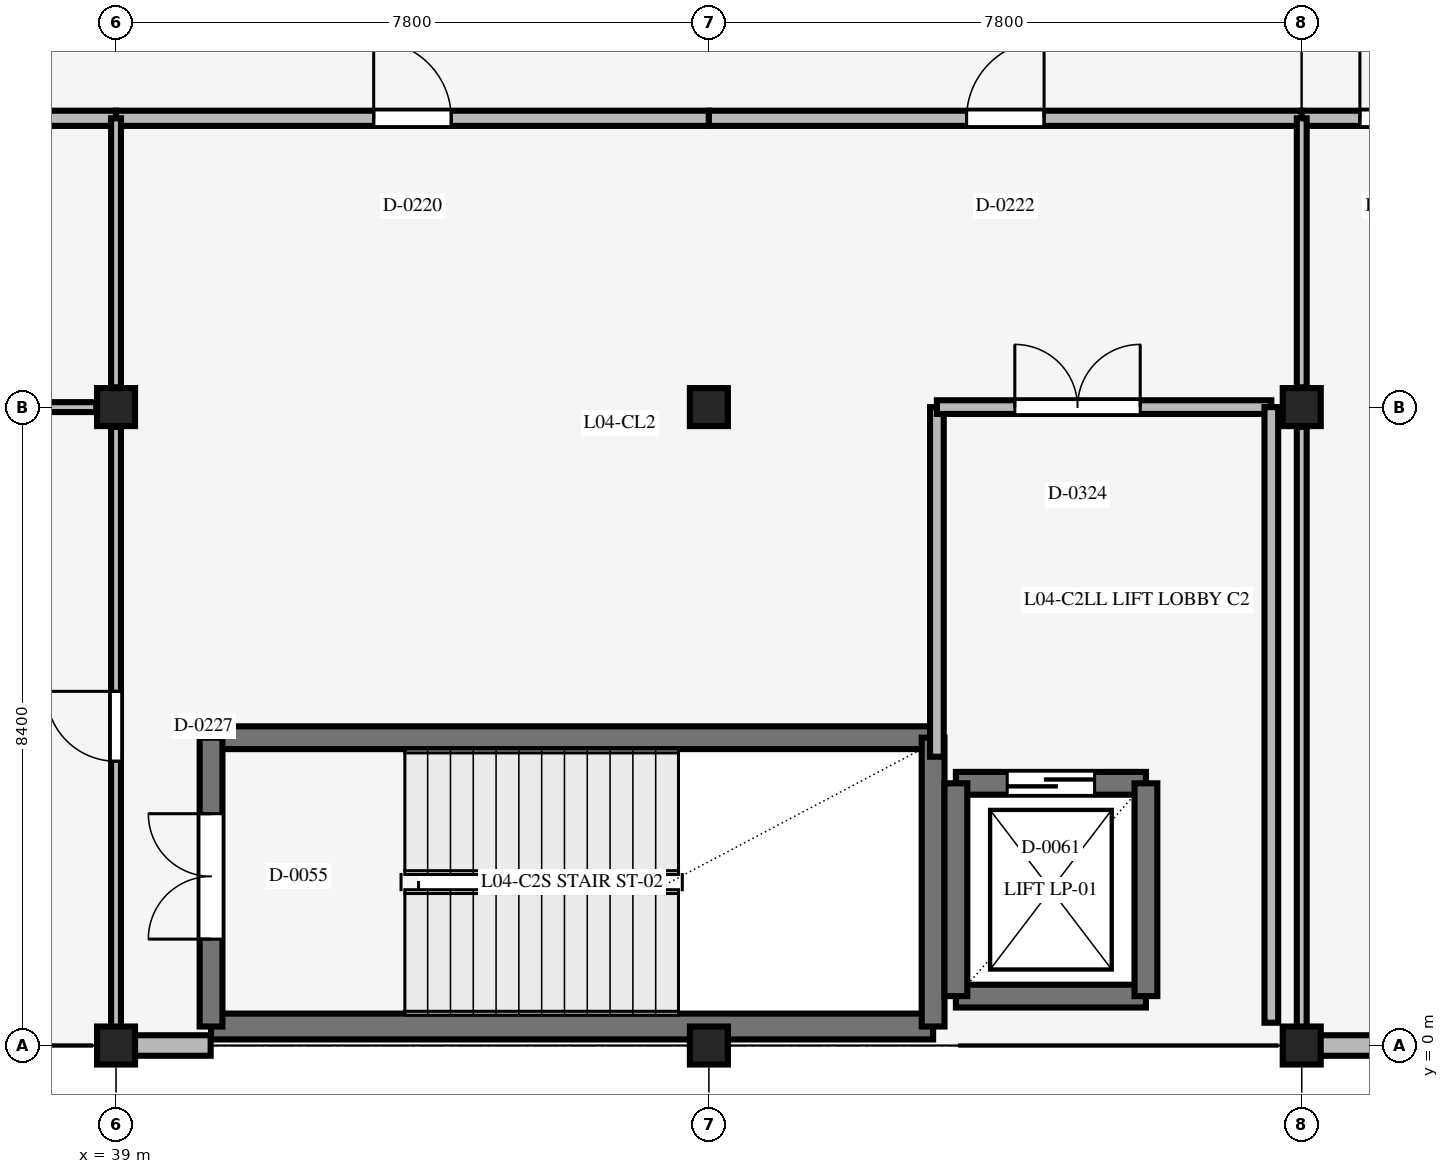
"""IFC4 building model, lengths in metres.
Left out: names, types, materials, properties, quantities, classifications, styles, units other than length and angle.
Written with IfcOpenShell. Run it as: python <this file> out.ifc"""

import sys

from ifc_helpers import new_model, si_unit, direction, frame, frame_2d, origin, origin_2d, place, context, subcontext, project, spatial, rectangle, extrude, element, fill, save


model = new_model("IFC4")
c1 = context("Model", 3, precision=1e-05, world=origin(), true_north=direction((0.0, 1.0)))
c2 = subcontext(c1, "Body", "Model", "MODEL_VIEW")
j1 = project(units=[si_unit("LENGTHUNIT", "METRE"), si_unit("PLANEANGLEUNIT", "RADIAN")], contexts=[c1])
p1 = place(None, origin())
s1 = spatial("IfcSite", under=j1, at=p1, CompositionType="ELEMENT")
p2 = place(p1, origin())
s2 = spatial("IfcBuilding", under=s1, at=p2, CompositionType="ELEMENT")
p3 = place(p2, frame((0.0, 0.0, 19.8)))
s3 = spatial("IfcBuildingStorey", under=s2, at=p3, CompositionType="ELEMENT", Elevation=19.8)
for number, where, z_axis, x_axis in (
    (1, (39.0, 0.0, 0.0), (0.0, 0.0, 1.0), (1.0, 0.0, 0.0)),
    (2, (39.0, 8.4, 0.0), (0.0, 0.0, 1.0), (1.0, 0.0, 0.0)),
    (3, (46.8, 0.0, 0.0), (0.0, 0.0, 1.0), (1.0, 0.0, 0.0)),
    (4, (46.8, 8.4, 0.0), (0.0, 0.0, 1.0), (1.0, 0.0, 0.0)),
    (5, (54.6, 0.0, 0.0), (0.0, 0.0, 1.0), (1.0, 0.0, 0.0)),
    (6, (54.6, 8.4, 0.0), (0.0, 0.0, 1.0), (1.0, 0.0, 0.0)),
):
    element("IfcColumn", number, at=place(p3, frame(where, z_axis=z_axis, x_axis=x_axis)), inside=s3, PredefinedType="COLUMN", context=c2, shape_type="SweptSolid", body=[
        extrude(rectangle(XDim=0.5, YDim=0.5, at=origin_2d()), origin(), (0.0, 0.0, 1.0), 3.9),
    ])
p4 = place(p3, frame((49.75, 0.25, 0.0), z_axis=(0.0, 0.0, 1.0), x_axis=(-1.0, 0.0, 0.0)))
e7 = element("IfcWall", 7, at=p4, inside=s3, PredefinedType="STANDARD", context=c2, shape_type="SweptSolid", body=[
    extrude(rectangle(XDim=9.5, YDim=0.34, at=frame_2d((4.75, 0.0))), origin(), (0.0, 0.0, 1.0), 3.9),
])
p5 = place(p3, frame((40.25, 4.05, 0.0), z_axis=(0.0, 0.0, 1.0), x_axis=(1.0, 0.0, 0.0)))
e8 = element("IfcWall", 8, at=p5, inside=s3, PredefinedType="SHEAR", context=c2, shape_type="SweptSolid", body=[
    extrude(rectangle(XDim=9.5, YDim=0.3, at=frame_2d((4.75, 0.0))), origin(), (0.0, 0.0, 1.0), 3.9),
])
p6 = place(p3, frame((40.25, 0.25, 0.0), z_axis=(0.0, 0.0, 1.0), x_axis=(0.0, 1.0, 0.0)))
e9 = element("IfcWall", 9, at=p6, inside=s3, PredefinedType="SHEAR", context=c2, shape_type="SweptSolid", body=[
    extrude(rectangle(XDim=3.8, YDim=0.3, at=frame_2d((1.9, 0.0))), origin(), (0.0, 0.0, 1.0), 3.9),
])
p7 = place(p6, frame((1.15, 0.0, 0.0)))
e10 = element("IfcOpeningElement", 10, at=p7, cuts=e9, PredefinedType="OPENING", context=c2, shape_type="SweptSolid", body=[
    extrude(rectangle(XDim=1.65, YDim=2.2, at=frame_2d((0.825, 1.1))), frame((0.0, 0.16, 0.0), z_axis=(0.0, -1.0, 0.0), x_axis=(1.0, 0.0, 0.0)), (0.0, 0.0, 1.0), 0.32),
])
p8 = place(p3, frame((49.75, 0.25, 0.0), z_axis=(0.0, 0.0, 1.0), x_axis=(0.0, 1.0, 0.0)))
e11 = element("IfcWall", 11, at=p8, inside=s3, PredefinedType="SHEAR", context=c2, shape_type="SweptSolid", body=[
    extrude(rectangle(XDim=3.8, YDim=0.3, at=frame_2d((1.9, 0.0))), origin(), (0.0, 0.0, 1.0), 3.9),
])
p9 = place(p3, frame((50.05, 0.65, 0.0), z_axis=(0.0, 0.0, 1.0), x_axis=(1.0, 0.0, 0.0)))
e12 = element("IfcWall", 12, at=p9, inside=s3, PredefinedType="SHEAR", context=c2, shape_type="SweptSolid", body=[
    extrude(rectangle(XDim=2.5, YDim=0.3, at=frame_2d((1.25, 0.0))), origin(), (0.0, 0.0, 1.0), 3.4),
])
p10 = place(p3, frame((50.05, 3.45, 0.0), z_axis=(0.0, 0.0, 1.0), x_axis=(1.0, 0.0, 0.0)))
e13 = element("IfcWall", 13, at=p10, inside=s3, PredefinedType="SHEAR", context=c2, shape_type="SweptSolid", body=[
    extrude(rectangle(XDim=2.5, YDim=0.3, at=frame_2d((1.25, 0.0))), origin(), (0.0, 0.0, 1.0), 3.4),
])
p11 = place(p10, frame((0.675, 0.0, 0.0)))
e14 = element("IfcOpeningElement", 14, at=p11, cuts=e13, PredefinedType="OPENING", context=c2, shape_type="SweptSolid", body=[
    extrude(rectangle(XDim=1.15, YDim=2.2, at=frame_2d((0.575, 1.1))), frame((0.0, 0.16, 0.0), z_axis=(0.0, -1.0, 0.0), x_axis=(1.0, 0.0, 0.0)), (0.0, 0.0, 1.0), 0.32),
])
for number, where, z_axis, x_axis in (
    (15, (50.05, 0.65, 0.0), (0.0, 0.0, 1.0), (0.0, 1.0, 0.0)),
    (16, (52.55, 0.65, 0.0), (0.0, 0.0, 1.0), (0.0, 1.0, 0.0)),
):
    element("IfcWall", number, at=place(p3, frame(where, z_axis=z_axis, x_axis=x_axis)), inside=s3, PredefinedType="SHEAR", context=c2, shape_type="SweptSolid", body=[
        extrude(rectangle(XDim=2.8, YDim=0.3, at=frame_2d((1.4, 0.0))), origin(), (0.0, 0.0, 1.0), 3.4),
    ])
p12 = place(p3, frame((40.245, 0.0, 0.0), z_axis=(0.0, 0.0, 1.0), x_axis=(-1.0, 0.0, 0.0)))
e17 = element("IfcWall", 17, at=p12, inside=s3, PredefinedType="STANDARD", context=c2, shape_type="SweptSolid", body=[
    extrude(rectangle(XDim=1.493, YDim=0.27, at=frame_2d((0.746, 0.0))), origin(), (0.0, 0.0, 1.0), 4.8),
])
p13 = place(p3, frame((62.76, 0.0, 0.0), z_axis=(0.0, 0.0, 1.0), x_axis=(-1.0, 0.0, 0.0)))
e18 = element("IfcWall", 18, at=p13, inside=s3, PredefinedType="STANDARD", context=c2, shape_type="SweptSolid", body=[
    extrude(rectangle(XDim=8.4, YDim=0.27, at=frame_2d((4.2, 0.0))), origin(), (0.0, 0.0, 1.0), 4.8),
])
p14 = place(p13, frame((1.01, 0.0, 0.9)))
e19 = element("IfcOpeningElement", 19, at=p14, cuts=e18, PredefinedType="OPENING", context=c2, shape_type="SweptSolid", body=[
    extrude(rectangle(XDim=3.2, YDim=2.1, at=frame_2d((1.6, 1.05))), frame((0.0, 0.145, 0.0), z_axis=(0.0, -1.0, 0.0), x_axis=(1.0, 0.0, 0.0)), (0.0, 0.0, 1.0), 0.29),
])
p15 = place(p3, frame((31.2, 12.2, 0.0), z_axis=(0.0, 0.0, 1.0), x_axis=(1.0, 0.0, 0.0)))
e20 = element("IfcWall", 20, at=p15, inside=s3, PredefinedType="STANDARD", context=c2, shape_type="SweptSolid", body=[
    extrude(rectangle(XDim=7.8, YDim=0.2, at=frame_2d((3.9, 0.0))), origin(), (0.0, 0.0, 1.0), 2.9),
])
p16 = place(p15, frame((3.39, 0.0, 0.0)))
e21 = element("IfcOpeningElement", 21, at=p16, cuts=e20, PredefinedType="OPENING", context=c2, shape_type="SweptSolid", body=[
    extrude(rectangle(XDim=1.02, YDim=2.15, at=frame_2d((0.51, 1.075))), frame((0.0, 0.11, 0.0), z_axis=(0.0, -1.0, 0.0), x_axis=(1.0, 0.0, 0.0)), (0.0, 0.0, 1.0), 0.22),
])
p17 = place(p3, frame((39.0, 12.2, 0.0), z_axis=(0.0, 0.0, 1.0), x_axis=(1.0, 0.0, 0.0)))
e22 = element("IfcWall", 22, at=p17, inside=s3, PredefinedType="STANDARD", context=c2, shape_type="SweptSolid", body=[
    extrude(rectangle(XDim=7.8, YDim=0.2, at=frame_2d((3.9, 0.0))), origin(), (0.0, 0.0, 1.0), 2.9),
])
p18 = place(p17, frame((3.39, 0.0, 0.0)))
e23 = element("IfcOpeningElement", 23, at=p18, cuts=e22, PredefinedType="OPENING", context=c2, shape_type="SweptSolid", body=[
    extrude(rectangle(XDim=1.02, YDim=2.15, at=frame_2d((0.51, 1.075))), frame((0.0, 0.11, 0.0), z_axis=(0.0, -1.0, 0.0), x_axis=(1.0, 0.0, 0.0)), (0.0, 0.0, 1.0), 0.22),
])
p19 = place(p3, frame((46.8, 12.2, 0.0), z_axis=(0.0, 0.0, 1.0), x_axis=(1.0, 0.0, 0.0)))
e24 = element("IfcWall", 24, at=p19, inside=s3, PredefinedType="STANDARD", context=c2, shape_type="SweptSolid", body=[
    extrude(rectangle(XDim=7.8, YDim=0.2, at=frame_2d((3.9, 0.0))), origin(), (0.0, 0.0, 1.0), 2.9),
])
p20 = place(p19, frame((3.39, 0.0, 0.0)))
e25 = element("IfcOpeningElement", 25, at=p20, cuts=e24, PredefinedType="OPENING", context=c2, shape_type="SweptSolid", body=[
    extrude(rectangle(XDim=1.02, YDim=2.15, at=frame_2d((0.51, 1.075))), frame((0.0, 0.11, 0.0), z_axis=(0.0, -1.0, 0.0), x_axis=(1.0, 0.0, 0.0)), (0.0, 0.0, 1.0), 0.22),
])
p21 = place(p3, frame((54.6, 12.2, 0.0), z_axis=(0.0, 0.0, 1.0), x_axis=(1.0, 0.0, 0.0)))
e26 = element("IfcWall", 26, at=p21, inside=s3, PredefinedType="STANDARD", context=c2, shape_type="SweptSolid", body=[
    extrude(rectangle(XDim=2.45, YDim=0.2, at=frame_2d((1.225, 0.0))), origin(), (0.0, 0.0, 1.0), 2.9),
])
p22 = place(p21, frame((0.765, 0.0, 0.0)))
e27 = element("IfcOpeningElement", 27, at=p22, cuts=e26, PredefinedType="OPENING", context=c2, shape_type="SweptSolid", body=[
    extrude(rectangle(XDim=0.92, YDim=2.15, at=frame_2d((0.46, 1.075))), frame((0.0, 0.11, 0.0), z_axis=(0.0, -1.0, 0.0), x_axis=(1.0, 0.0, 0.0)), (0.0, 0.0, 1.0), 0.22),
])
p23 = place(p3, frame((39.0, 0.14, 0.0), z_axis=(0.0, 0.0, 1.0), x_axis=(0.0, 1.0, 0.0)))
e28 = element("IfcWall", 28, at=p23, inside=s3, PredefinedType="STANDARD", context=c2, shape_type="SweptSolid", body=[
    extrude(rectangle(XDim=8.0, YDim=0.13, at=frame_2d((4.0, 0.0))), origin(), (0.0, 0.0, 1.0), 2.9),
])
p24 = place(p23, frame((3.6, 0.0, 0.0)))
e29 = element("IfcOpeningElement", 29, at=p24, cuts=e28, PredefinedType="OPENING", context=c2, shape_type="SweptSolid", body=[
    extrude(rectangle(XDim=0.92, YDim=2.15, at=frame_2d((0.46, 1.075))), frame((0.0, 0.075, 0.0), z_axis=(0.0, -1.0, 0.0), x_axis=(1.0, 0.0, 0.0)), (0.0, 0.0, 1.0), 0.15),
])
p25 = place(p3, frame((39.0, 8.66, 0.0), z_axis=(0.0, 0.0, 1.0), x_axis=(0.0, 1.0, 0.0)))
e30 = element("IfcWall", 30, at=p25, inside=s3, PredefinedType="STANDARD", context=c2, shape_type="SweptSolid", body=[
    extrude(rectangle(XDim=3.54, YDim=0.13, at=frame_2d((1.77, 0.0))), origin(), (0.0, 0.0, 1.0), 2.9),
])
p26 = place(p3, frame((54.6, 0.14, 0.0), z_axis=(0.0, 0.0, 1.0), x_axis=(0.0, 1.0, 0.0)))
e31 = element("IfcWall", 31, at=p26, inside=s3, PredefinedType="STANDARD", context=c2, shape_type="SweptSolid", body=[
    extrude(rectangle(XDim=8.0, YDim=0.13, at=frame_2d((4.0, 0.0))), origin(), (0.0, 0.0, 1.0), 2.9),
])
p27 = place(p3, frame((54.6, 8.66, 0.0), z_axis=(0.0, 0.0, 1.0), x_axis=(0.0, 1.0, 0.0)))
e32 = element("IfcWall", 32, at=p27, inside=s3, PredefinedType="STANDARD", context=c2, shape_type="SweptSolid", body=[
    extrude(rectangle(XDim=3.54, YDim=0.13, at=frame_2d((1.77, 0.0))), origin(), (0.0, 0.0, 1.0), 2.9),
])
p28 = place(p3, frame((31.46, 8.4, 0.0), z_axis=(0.0, 0.0, 1.0), x_axis=(1.0, 0.0, 0.0)))
e33 = element("IfcWall", 33, at=p28, inside=s3, PredefinedType="STANDARD", context=c2, shape_type="SweptSolid", body=[
    extrude(rectangle(XDim=7.28, YDim=0.13, at=frame_2d((3.64, 0.0))), origin(), (0.0, 0.0, 1.0), 2.9),
])
p29 = place(p3, frame((49.8, 3.8, 0.0), z_axis=(0.0, 0.0, 1.0), x_axis=(0.0, 1.0, 0.0)))
e34 = element("IfcWall", 34, at=p29, inside=s3, PredefinedType="STANDARD", context=c2, shape_type="SweptSolid", body=[
    extrude(rectangle(XDim=4.6, YDim=0.18, at=frame_2d((2.3, 0.0))), origin(), (0.0, 0.0, 1.0), 2.9),
])
p30 = place(p3, frame((49.8, 8.4, 0.0), z_axis=(0.0, 0.0, 1.0), x_axis=(1.0, 0.0, 0.0)))
e35 = element("IfcWall", 35, at=p30, inside=s3, PredefinedType="STANDARD", context=c2, shape_type="SweptSolid", body=[
    extrude(rectangle(XDim=4.4, YDim=0.18, at=frame_2d((2.2, 0.0))), origin(), (0.0, 0.0, 1.0), 2.9),
])
p31 = place(p30, frame((1.025, 0.0, 0.0)))
e36 = element("IfcOpeningElement", 36, at=p31, cuts=e35, PredefinedType="OPENING", context=c2, shape_type="SweptSolid", body=[
    extrude(rectangle(XDim=1.65, YDim=2.2, at=frame_2d((0.825, 1.1))), frame((0.0, 0.1, 0.0), z_axis=(0.0, -1.0, 0.0), x_axis=(1.0, 0.0, 0.0)), (0.0, 0.0, 1.0), 0.2),
])
p32 = place(p3, frame((54.2, 0.3, 0.0), z_axis=(0.0, 0.0, 1.0), x_axis=(0.0, 1.0, 0.0)))
e37 = element("IfcWall", 37, at=p32, inside=s3, PredefinedType="STANDARD", context=c2, shape_type="SweptSolid", body=[
    extrude(rectangle(XDim=8.1, YDim=0.18, at=frame_2d((4.05, 0.0))), origin(), (0.0, 0.0, 1.0), 2.9),
])
p33 = place(p7, origin())
e38 = element("IfcDoor", 38, at=p33, inside=s3, OperationType="DOUBLE_DOOR_SINGLE_SWING", PredefinedType="DOOR", context=c2, shape_type="SweptSolid", body=[
    extrude(rectangle(XDim=1.65, YDim=2.2, at=frame_2d((0.825, 1.1))), frame((0.0, 0.025, 0.0), z_axis=(0.0, -1.0, 0.0), x_axis=(1.0, 0.0, 0.0)), (0.0, 0.0, 1.0), 0.05),
])
fill(e10, e38)
p34 = place(p11, origin())
e39 = element("IfcDoor", 39, at=p34, inside=s3, OperationType="DOUBLE_DOOR_SLIDING", PredefinedType="DOOR", context=c2, shape_type="SweptSolid", body=[
    extrude(rectangle(XDim=1.15, YDim=2.2, at=frame_2d((0.575, 1.1))), frame((0.0, 0.025, 0.0), z_axis=(0.0, -1.0, 0.0), x_axis=(1.0, 0.0, 0.0)), (0.0, 0.0, 1.0), 0.05),
])
fill(e14, e39)
p35 = place(p18, origin())
e40 = element("IfcDoor", 40, at=p35, inside=s3, OperationType="SINGLE_SWING_LEFT", PredefinedType="DOOR", context=c2, shape_type="SweptSolid", body=[
    extrude(rectangle(XDim=1.02, YDim=2.15, at=frame_2d((0.51, 1.075))), frame((0.0, 0.025, 0.0), z_axis=(0.0, -1.0, 0.0), x_axis=(1.0, 0.0, 0.0)), (0.0, 0.0, 1.0), 0.05),
])
fill(e23, e40)
p36 = place(p20, origin())
e41 = element("IfcDoor", 41, at=p36, inside=s3, OperationType="SINGLE_SWING_RIGHT", PredefinedType="DOOR", context=c2, shape_type="SweptSolid", body=[
    extrude(rectangle(XDim=1.02, YDim=2.15, at=frame_2d((0.51, 1.075))), frame((0.0, 0.025, 0.0), z_axis=(0.0, -1.0, 0.0), x_axis=(1.0, 0.0, 0.0)), (0.0, 0.0, 1.0), 0.05),
])
fill(e25, e41)
p37 = place(p22, origin())
e42 = element("IfcDoor", 42, at=p37, inside=s3, OperationType="SINGLE_SWING_LEFT", PredefinedType="DOOR", context=c2, shape_type="SweptSolid", body=[
    extrude(rectangle(XDim=0.92, YDim=2.15, at=frame_2d((0.46, 1.075))), frame((0.0, 0.025, 0.0), z_axis=(0.0, -1.0, 0.0), x_axis=(1.0, 0.0, 0.0)), (0.0, 0.0, 1.0), 0.05),
])
fill(e27, e42)
p38 = place(p24, origin())
e43 = element("IfcDoor", 43, at=p38, inside=s3, OperationType="SINGLE_SWING_RIGHT", PredefinedType="DOOR", context=c2, shape_type="SweptSolid", body=[
    extrude(rectangle(XDim=0.92, YDim=2.15, at=frame_2d((0.46, 1.075))), frame((0.0, 0.025, 0.0), z_axis=(0.0, -1.0, 0.0), x_axis=(1.0, 0.0, 0.0)), (0.0, 0.0, 1.0), 0.05),
])
fill(e29, e43)
p39 = place(p31, origin())
e44 = element("IfcDoor", 44, at=p39, inside=s3, OperationType="DOUBLE_DOOR_SINGLE_SWING", PredefinedType="DOOR", context=c2, shape_type="SweptSolid", body=[
    extrude(rectangle(XDim=1.65, YDim=2.2, at=frame_2d((0.825, 1.1))), frame((0.0, 0.025, 0.0), z_axis=(0.0, -1.0, 0.0), x_axis=(1.0, 0.0, 0.0)), (0.0, 0.0, 1.0), 0.05),
])
fill(e36, e44)
save(model, sys.argv[1])
